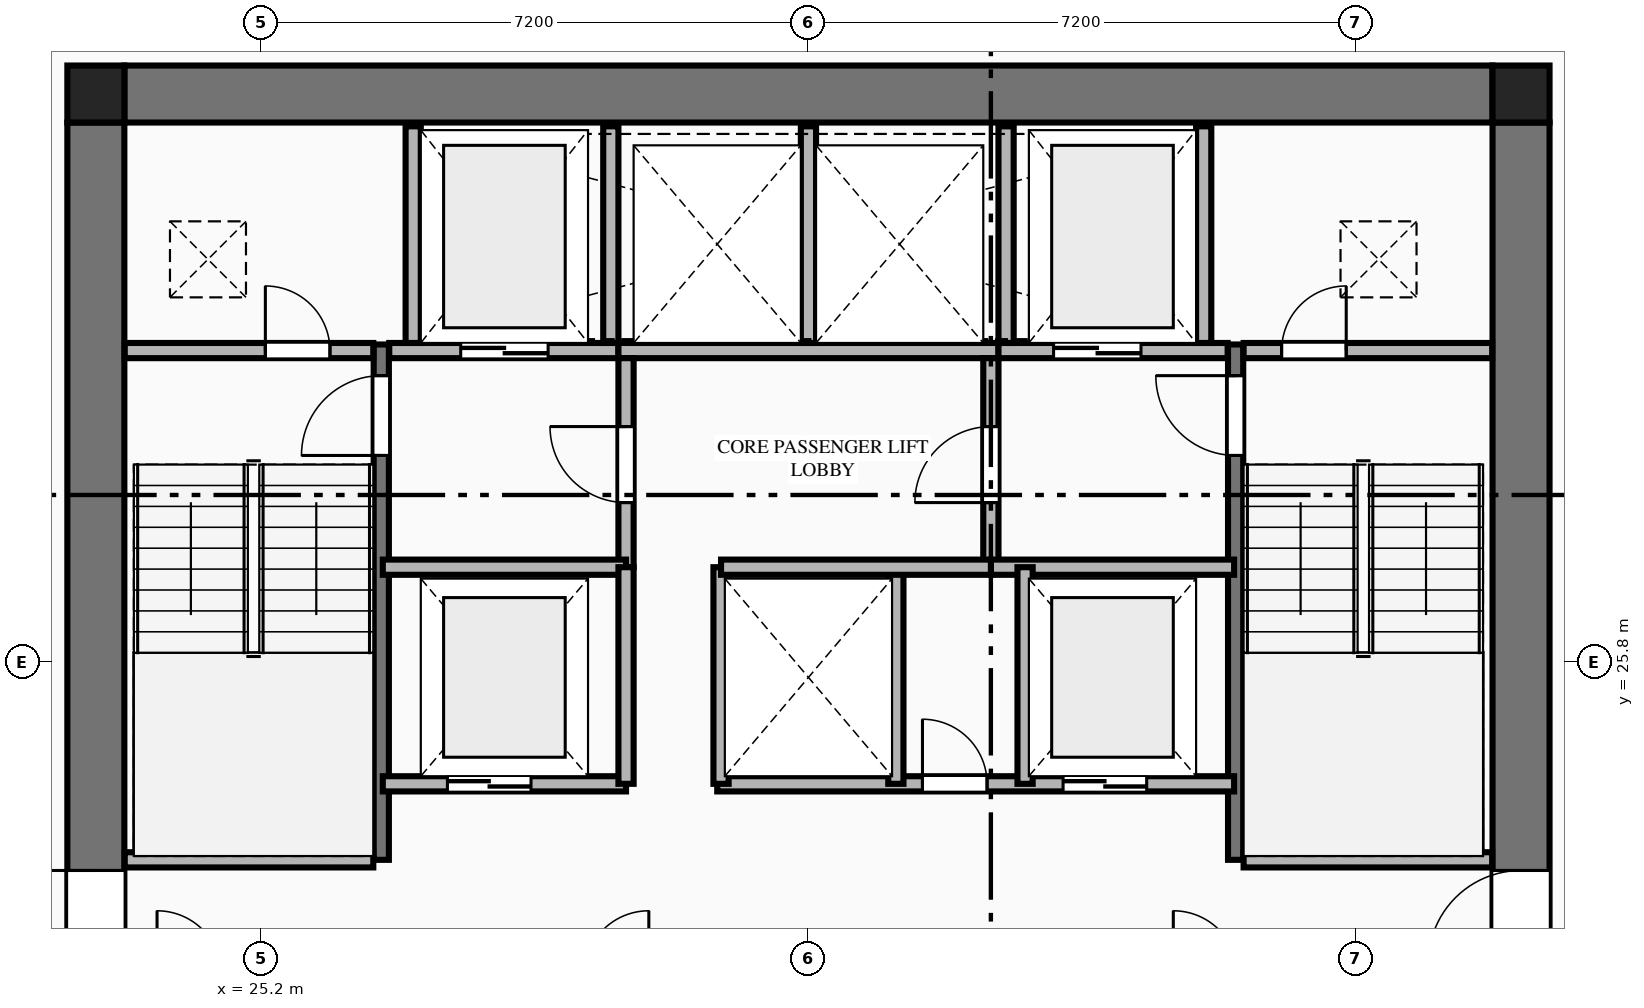
"""IFC4 building model, lengths in metres.
Left out: names, types, materials, properties, quantities, classifications, styles, units other than length and angle.
Written with IfcOpenShell. Run it as: python <this file> out.ifc"""

import sys

from ifc_helpers import new_model, si_unit, direction, frame, frame_2d, origin, origin_2d, place, context, subcontext, project, spatial, rectangle, extrude, element, fill, save


model = new_model("IFC4")
c1 = context("Model", 3, precision=1e-05, world=origin(), true_north=direction((0.0, 1.0)))
c2 = subcontext(c1, "Body", "Model", "MODEL_VIEW")
j1 = project(units=[si_unit("LENGTHUNIT", "METRE"), si_unit("PLANEANGLEUNIT", "RADIAN")], contexts=[c1])
p1 = place(None, origin())
s1 = spatial("IfcSite", under=j1, at=p1, CompositionType="ELEMENT")
p2 = place(p1, origin())
s2 = spatial("IfcBuilding", under=s1, at=p2, CompositionType="ELEMENT")
p3 = place(p2, frame((0.0, 0.0, 101.95)))
s3 = spatial("IfcBuildingStorey", under=s2, at=p3, CompositionType="ELEMENT", Elevation=101.95)
for number, where, z_axis, x_axis in (
    (1, (41.775, 33.275, 0.0), (0.0, 0.0, 1.0), (1.0, 0.0, 0.0)),
    (2, (23.025, 33.275, 0.0), (0.0, 0.0, 1.0), (1.0, 0.0, 0.0)),
):
    element("IfcColumn", number, at=place(p3, frame(where, z_axis=z_axis, x_axis=x_axis)), inside=s3, PredefinedType="COLUMN", context=c2, shape_type="SweptSolid", body=[
        extrude(rectangle(XDim=0.75, YDim=0.75, at=origin_2d()), origin(), (0.0, 0.0, 1.0), 3.55),
    ])
p4 = place(p3, frame((23.4, 33.275, 0.0), z_axis=(0.0, 0.0, 1.0), x_axis=(1.0, 0.0, 0.0)))
e3 = element("IfcWall", 3, at=p4, inside=s3, PredefinedType="SHEAR", context=c2, shape_type="SweptSolid", body=[
    extrude(rectangle(XDim=18.0, YDim=0.75, at=frame_2d((9.0, 0.0))), origin(), (0.0, 0.0, 1.0), 3.34),
])
p5 = place(p3, frame((23.025, 18.9, 0.0), z_axis=(0.0, 0.0, 1.0), x_axis=(0.0, 1.0, 0.0)))
e4 = element("IfcWall", 4, at=p5, inside=s3, PredefinedType="SHEAR", context=c2, shape_type="SweptSolid", body=[
    extrude(rectangle(XDim=14.0, YDim=0.75, at=frame_2d((7.0, 0.0))), origin(), (0.0, 0.0, 1.0), 3.34),
])
p6 = place(p5, frame((2.94, 0.0, 0.0)))
e5 = element("IfcOpeningElement", 5, at=p6, cuts=e4, PredefinedType="OPENING", context=c2, shape_type="SweptSolid", body=[
    extrude(rectangle(XDim=1.22, YDim=2.25, at=frame_2d((0.61, 1.125))), frame((0.0, 0.385, 0.0), z_axis=(0.0, -1.0, 0.0), x_axis=(1.0, 0.0, 0.0)), (0.0, 0.0, 1.0), 0.77),
])
p7 = place(p3, frame((41.775, 18.9, 0.0), z_axis=(0.0, 0.0, 1.0), x_axis=(0.0, 1.0, 0.0)))
e6 = element("IfcWall", 6, at=p7, inside=s3, PredefinedType="SHEAR", context=c2, shape_type="SweptSolid", body=[
    extrude(rectangle(XDim=14.0, YDim=0.75, at=frame_2d((7.0, 0.0))), origin(), (0.0, 0.0, 1.0), 3.34),
])
p8 = place(p7, frame((2.94, 0.0, 0.0)))
e7 = element("IfcOpeningElement", 7, at=p8, cuts=e6, PredefinedType="OPENING", context=c2, shape_type="SweptSolid", body=[
    extrude(rectangle(XDim=1.22, YDim=2.25, at=frame_2d((0.61, 1.125))), frame((0.0, 0.385, 0.0), z_axis=(0.0, -1.0, 0.0), x_axis=(1.0, 0.0, 0.0)), (0.0, 0.0, 1.0), 0.77),
])
p9 = place(p3, frame((26.78, 23.2, 0.0), z_axis=(0.0, 0.0, 1.0), x_axis=(0.0, 1.0, 0.0)))
e8 = element("IfcWall", 8, at=p9, inside=s3, PredefinedType="SHEAR", context=c2, shape_type="SweptSolid", body=[
    extrude(rectangle(XDim=6.78, YDim=0.2, at=frame_2d((3.39, 0.0))), origin(), (0.0, 0.0, 1.0), 3.55),
])
p10 = place(p9, frame((5.32, 0.0, 0.0)))
e9 = element("IfcOpeningElement", 9, at=p10, cuts=e8, PredefinedType="OPENING", context=c2, shape_type="SweptSolid", body=[
    extrude(rectangle(XDim=1.05, YDim=2.15, at=frame_2d((0.525, 1.075))), frame((0.0, 0.11, 0.0), z_axis=(0.0, -1.0, 0.0), x_axis=(1.0, 0.0, 0.0)), (0.0, 0.0, 1.0), 0.22),
])
p11 = place(p3, frame((23.405, 23.2, 0.0), z_axis=(0.0, 0.0, 1.0), x_axis=(1.0, 0.0, 0.0)))
e10 = element("IfcWall", 10, at=p11, inside=s3, PredefinedType="PLUMBINGWALL", context=c2, shape_type="SweptSolid", body=[
    extrude(rectangle(XDim=3.27, YDim=0.2, at=frame_2d((1.635, 0.0))), origin(), (0.0, 0.0, 1.0), 3.34),
])
p12 = place(p3, frame((38.02, 23.2, 0.0), z_axis=(0.0, 0.0, 1.0), x_axis=(0.0, 1.0, 0.0)))
e11 = element("IfcWall", 11, at=p12, inside=s3, PredefinedType="SHEAR", context=c2, shape_type="SweptSolid", body=[
    extrude(rectangle(XDim=6.78, YDim=0.2, at=frame_2d((3.39, 0.0))), origin(), (0.0, 0.0, 1.0), 3.55),
])
p13 = place(p12, frame((5.32, 0.0, 0.0)))
e12 = element("IfcOpeningElement", 12, at=p13, cuts=e11, PredefinedType="OPENING", context=c2, shape_type="SweptSolid", body=[
    extrude(rectangle(XDim=1.05, YDim=2.15, at=frame_2d((0.525, 1.075))), frame((0.0, 0.11, 0.0), z_axis=(0.0, -1.0, 0.0), x_axis=(1.0, 0.0, 0.0)), (0.0, 0.0, 1.0), 0.22),
])
p14 = place(p3, frame((38.125, 23.2, 0.0), z_axis=(0.0, 0.0, 1.0), x_axis=(1.0, 0.0, 0.0)))
e13 = element("IfcWall", 13, at=p14, inside=s3, PredefinedType="PLUMBINGWALL", context=c2, shape_type="SweptSolid", body=[
    extrude(rectangle(XDim=3.27, YDim=0.2, at=frame_2d((1.635, 0.0))), origin(), (0.0, 0.0, 1.0), 3.34),
])
p15 = place(p3, frame((23.405, 29.9, 0.0), z_axis=(0.0, 0.0, 1.0), x_axis=(1.0, 0.0, 0.0)))
e14 = element("IfcWall", 14, at=p15, inside=s3, PredefinedType="PLUMBINGWALL", context=c2, shape_type="SweptSolid", body=[
    extrude(rectangle(XDim=3.27, YDim=0.2, at=frame_2d((1.635, 0.0))), origin(), (0.0, 0.0, 1.0), 3.34),
])
p16 = place(p15, frame((1.85, 0.0, 0.0)))
e15 = element("IfcOpeningElement", 15, at=p16, cuts=e14, PredefinedType="OPENING", context=c2, shape_type="SweptSolid", body=[
    extrude(rectangle(XDim=0.85, YDim=2.05, at=frame_2d((0.425, 1.025))), frame((0.0, 0.11, 0.0), z_axis=(0.0, -1.0, 0.0), x_axis=(1.0, 0.0, 0.0)), (0.0, 0.0, 1.0), 0.22),
])
p17 = place(p3, frame((26.885, 29.9, 0.0), z_axis=(0.0, 0.0, 1.0), x_axis=(1.0, 0.0, 0.0)))
e16 = element("IfcWall", 16, at=p17, inside=s3, PredefinedType="PLUMBINGWALL", context=c2, shape_type="SweptSolid", body=[
    extrude(rectangle(XDim=3.015, YDim=0.2, at=frame_2d((1.507, 0.0))), origin(), (0.0, 0.0, 1.0), 3.34),
])
p18 = place(p17, frame((0.94, 0.0, 0.0)))
e17 = element("IfcOpeningElement", 17, at=p18, cuts=e16, PredefinedType="OPENING", context=c2, shape_type="SweptSolid", body=[
    extrude(rectangle(XDim=1.15, YDim=2.2, at=frame_2d((0.575, 1.1))), frame((0.0, 0.11, 0.0), z_axis=(0.0, -1.0, 0.0), x_axis=(1.0, 0.0, 0.0)), (0.0, 0.0, 1.0), 0.22),
])
p19 = place(p3, frame((29.9, 29.9, 0.0), z_axis=(0.0, 0.0, 1.0), x_axis=(1.0, 0.0, 0.0)))
e18 = element("IfcWall", 18, at=p19, inside=s3, PredefinedType="PLUMBINGWALL", context=c2, shape_type="SweptSolid", body=[
    extrude(rectangle(XDim=5.0, YDim=0.2, at=frame_2d((2.5, 0.0))), origin(), (0.0, 0.0, 1.0), 3.34),
])
p20 = place(p3, frame((34.9, 29.9, 0.0), z_axis=(0.0, 0.0, 1.0), x_axis=(1.0, 0.0, 0.0)))
e19 = element("IfcWall", 19, at=p20, inside=s3, PredefinedType="PLUMBINGWALL", context=c2, shape_type="SweptSolid", body=[
    extrude(rectangle(XDim=3.015, YDim=0.2, at=frame_2d((1.508, 0.0))), origin(), (0.0, 0.0, 1.0), 3.34),
])
p21 = place(p20, frame((0.725, 0.0, 0.0)))
e20 = element("IfcOpeningElement", 20, at=p21, cuts=e19, PredefinedType="OPENING", context=c2, shape_type="SweptSolid", body=[
    extrude(rectangle(XDim=1.15, YDim=2.2, at=frame_2d((0.575, 1.1))), frame((0.0, 0.11, 0.0), z_axis=(0.0, -1.0, 0.0), x_axis=(1.0, 0.0, 0.0)), (0.0, 0.0, 1.0), 0.22),
])
p22 = place(p3, frame((38.125, 29.9, 0.0), z_axis=(0.0, 0.0, 1.0), x_axis=(1.0, 0.0, 0.0)))
e21 = element("IfcWall", 21, at=p22, inside=s3, PredefinedType="PLUMBINGWALL", context=c2, shape_type="SweptSolid", body=[
    extrude(rectangle(XDim=3.27, YDim=0.2, at=frame_2d((1.635, 0.0))), origin(), (0.0, 0.0, 1.0), 3.34),
])
p23 = place(p22, frame((0.5, 0.0, 0.0)))
e22 = element("IfcOpeningElement", 22, at=p23, cuts=e21, PredefinedType="OPENING", context=c2, shape_type="SweptSolid", body=[
    extrude(rectangle(XDim=0.85, YDim=2.05, at=frame_2d((0.425, 1.025))), frame((0.0, 0.11, 0.0), z_axis=(0.0, -1.0, 0.0), x_axis=(1.0, 0.0, 0.0)), (0.0, 0.0, 1.0), 0.22),
])
for number, where, z_axis, x_axis in (
    (23, (27.2, 30.0, 0.0), (0.0, 0.0, 1.0), (0.0, 1.0, 0.0)),
    (24, (29.8, 30.0, 0.0), (0.0, 0.0, 1.0), (0.0, 1.0, 0.0)),
    (25, (32.4, 30.0, 0.0), (0.0, 0.0, 1.0), (0.0, 1.0, 0.0)),
    (26, (35.0, 30.0, 0.0), (0.0, 0.0, 1.0), (0.0, 1.0, 0.0)),
    (27, (37.6, 30.0, 0.0), (0.0, 0.0, 1.0), (0.0, 1.0, 0.0)),
):
    element("IfcWall", number, at=place(p3, frame(where, z_axis=z_axis, x_axis=x_axis)), inside=s3, PredefinedType="PLUMBINGWALL", context=c2, shape_type="SweptSolid", body=[
        extrude(rectangle(XDim=2.85, YDim=0.2, at=frame_2d((1.425, 0.0))), origin(), (0.0, 0.0, 1.0), 3.34),
    ])
p24 = place(p3, frame((30.0, 27.05, 0.0), z_axis=(0.0, 0.0, 1.0), x_axis=(0.0, 1.0, 0.0)))
e28 = element("IfcWall", 28, at=p24, inside=s3, PredefinedType="PLUMBINGWALL", context=c2, shape_type="SweptSolid", body=[
    extrude(rectangle(XDim=2.75, YDim=0.2, at=frame_2d((1.375, 0.0))), origin(), (0.0, 0.0, 1.0), 3.34),
])
p25 = place(p24, frame((0.85, 0.0, 0.0)))
e29 = element("IfcOpeningElement", 29, at=p25, cuts=e28, PredefinedType="OPENING", context=c2, shape_type="SweptSolid", body=[
    extrude(rectangle(XDim=1.0, YDim=2.15, at=frame_2d((0.5, 1.075))), frame((0.0, 0.11, 0.0), z_axis=(0.0, -1.0, 0.0), x_axis=(1.0, 0.0, 0.0)), (0.0, 0.0, 1.0), 0.22),
])
p26 = place(p3, frame((26.8, 27.05, 0.0), z_axis=(0.0, 0.0, 1.0), x_axis=(1.0, 0.0, 0.0)))
e30 = element("IfcWall", 30, at=p26, inside=s3, PredefinedType="PLUMBINGWALL", context=c2, shape_type="SweptSolid", body=[
    extrude(rectangle(XDim=3.2, YDim=0.2, at=frame_2d((1.6, 0.0))), origin(), (0.0, 0.0, 1.0), 3.34),
])
p27 = place(p3, frame((34.8, 27.05, 0.0), z_axis=(0.0, 0.0, 1.0), x_axis=(0.0, 1.0, 0.0)))
e31 = element("IfcWall", 31, at=p27, inside=s3, PredefinedType="PLUMBINGWALL", context=c2, shape_type="SweptSolid", body=[
    extrude(rectangle(XDim=2.75, YDim=0.2, at=frame_2d((1.375, 0.0))), origin(), (0.0, 0.0, 1.0), 3.34),
])
p28 = place(p27, frame((0.85, 0.0, 0.0)))
e32 = element("IfcOpeningElement", 32, at=p28, cuts=e31, PredefinedType="OPENING", context=c2, shape_type="SweptSolid", body=[
    extrude(rectangle(XDim=1.0, YDim=2.15, at=frame_2d((0.5, 1.075))), frame((0.0, 0.11, 0.0), z_axis=(0.0, -1.0, 0.0), x_axis=(1.0, 0.0, 0.0)), (0.0, 0.0, 1.0), 0.22),
])
p29 = place(p3, frame((34.8, 27.05, 0.0), z_axis=(0.0, 0.0, 1.0), x_axis=(1.0, 0.0, 0.0)))
e33 = element("IfcWall", 33, at=p29, inside=s3, PredefinedType="PLUMBINGWALL", context=c2, shape_type="SweptSolid", body=[
    extrude(rectangle(XDim=3.2, YDim=0.2, at=frame_2d((1.6, 0.0))), origin(), (0.0, 0.0, 1.0), 3.34),
])
p30 = place(p3, frame((26.8, 24.2, 0.0), z_axis=(0.0, 0.0, 1.0), x_axis=(1.0, 0.0, 0.0)))
e34 = element("IfcWall", 34, at=p30, inside=s3, PredefinedType="PLUMBINGWALL", context=c2, shape_type="SweptSolid", body=[
    extrude(rectangle(XDim=3.2, YDim=0.2, at=frame_2d((1.6, 0.0))), origin(), (0.0, 0.0, 1.0), 3.34),
])
p31 = place(p30, frame((0.85, 0.0, 0.0)))
e35 = element("IfcOpeningElement", 35, at=p31, cuts=e34, PredefinedType="OPENING", context=c2, shape_type="SweptSolid", body=[
    extrude(rectangle(XDim=1.1, YDim=2.2, at=frame_2d((0.55, 1.1))), frame((0.0, 0.11, 0.0), z_axis=(0.0, -1.0, 0.0), x_axis=(1.0, 0.0, 0.0)), (0.0, 0.0, 1.0), 0.22),
])
p32 = place(p3, frame((30.0, 24.2, 0.0), z_axis=(0.0, 0.0, 1.0), x_axis=(0.0, 1.0, 0.0)))
e36 = element("IfcWall", 36, at=p32, inside=s3, PredefinedType="PLUMBINGWALL", context=c2, shape_type="SweptSolid", body=[
    extrude(rectangle(XDim=2.85, YDim=0.2, at=frame_2d((1.425, 0.0))), origin(), (0.0, 0.0, 1.0), 3.34),
])
p33 = place(p3, frame((31.2, 24.2, 0.0), z_axis=(0.0, 0.0, 1.0), x_axis=(1.0, 0.0, 0.0)))
e37 = element("IfcWall", 37, at=p33, inside=s3, PredefinedType="PLUMBINGWALL", context=c2, shape_type="SweptSolid", body=[
    extrude(rectangle(XDim=6.8, YDim=0.2, at=frame_2d((3.4, 0.0))), origin(), (0.0, 0.0, 1.0), 3.34),
])
p34 = place(p33, frame((2.7, 0.0, 0.0)))
e38 = element("IfcOpeningElement", 38, at=p34, cuts=e37, PredefinedType="OPENING", context=c2, shape_type="SweptSolid", body=[
    extrude(rectangle(XDim=0.85, YDim=2.05, at=frame_2d((0.425, 1.025))), frame((0.0, 0.11, 0.0), z_axis=(0.0, -1.0, 0.0), x_axis=(1.0, 0.0, 0.0)), (0.0, 0.0, 1.0), 0.22),
])
p35 = place(p33, frame((4.55, 0.0, 0.0)))
e39 = element("IfcOpeningElement", 39, at=p35, cuts=e37, PredefinedType="OPENING", context=c2, shape_type="SweptSolid", body=[
    extrude(rectangle(XDim=1.1, YDim=2.2, at=frame_2d((0.55, 1.1))), frame((0.0, 0.11, 0.0), z_axis=(0.0, -1.0, 0.0), x_axis=(1.0, 0.0, 0.0)), (0.0, 0.0, 1.0), 0.22),
])
for number, where, z_axis, x_axis in (
    (40, (31.25, 24.2, 0.0), (0.0, 0.0, 1.0), (0.0, 1.0, 0.0)),
    (41, (33.55, 24.2, 0.0), (0.0, 0.0, 1.0), (0.0, 1.0, 0.0)),
    (42, (35.25, 24.2, 0.0), (0.0, 0.0, 1.0), (0.0, 1.0, 0.0)),
):
    element("IfcWall", number, at=place(p3, frame(where, z_axis=z_axis, x_axis=x_axis)), inside=s3, PredefinedType="PLUMBINGWALL", context=c2, shape_type="SweptSolid", body=[
        extrude(rectangle(XDim=2.85, YDim=0.2, at=frame_2d((1.425, 0.0))), origin(), (0.0, 0.0, 1.0), 3.34),
    ])
p36 = place(p3, frame((31.25, 27.05, 0.0), z_axis=(0.0, 0.0, 1.0), x_axis=(1.0, 0.0, 0.0)))
e43 = element("IfcWall", 43, at=p36, inside=s3, PredefinedType="PLUMBINGWALL", context=c2, shape_type="SweptSolid", body=[
    extrude(rectangle(XDim=3.55, YDim=0.2, at=frame_2d((1.775, 0.0))), origin(), (0.0, 0.0, 1.0), 3.34),
])
p37 = place(p6, origin())
e44 = element("IfcDoor", 44, at=p37, inside=s3, OperationType="SINGLE_SWING_RIGHT", PredefinedType="DOOR", context=c2, shape_type="SweptSolid", body=[
    extrude(rectangle(XDim=1.22, YDim=2.25, at=frame_2d((0.61, 1.125))), frame((0.0, 0.025, 0.0), z_axis=(0.0, -1.0, 0.0), x_axis=(1.0, 0.0, 0.0)), (0.0, 0.0, 1.0), 0.05),
])
fill(e5, e44)
p38 = place(p8, origin())
e45 = element("IfcDoor", 45, at=p38, inside=s3, OperationType="SINGLE_SWING_LEFT", PredefinedType="DOOR", context=c2, shape_type="SweptSolid", body=[
    extrude(rectangle(XDim=1.22, YDim=2.25, at=frame_2d((0.61, 1.125))), frame((0.0, 0.025, 0.0), z_axis=(0.0, -1.0, 0.0), x_axis=(1.0, 0.0, 0.0)), (0.0, 0.0, 1.0), 0.05),
])
fill(e7, e45)
p39 = place(p10, origin())
e46 = element("IfcDoor", 46, at=p39, inside=s3, OperationType="SINGLE_SWING_LEFT", PredefinedType="DOOR", context=c2, shape_type="SweptSolid", body=[
    extrude(rectangle(XDim=1.05, YDim=2.15, at=frame_2d((0.525, 1.075))), frame((0.0, 0.025, 0.0), z_axis=(0.0, -1.0, 0.0), x_axis=(1.0, 0.0, 0.0)), (0.0, 0.0, 1.0), 0.05),
])
fill(e9, e46)
p40 = place(p13, origin())
e47 = element("IfcDoor", 47, at=p40, inside=s3, OperationType="SINGLE_SWING_RIGHT", PredefinedType="DOOR", context=c2, shape_type="SweptSolid", body=[
    extrude(rectangle(XDim=1.05, YDim=2.15, at=frame_2d((0.525, 1.075))), frame((0.0, 0.025, 0.0), z_axis=(0.0, -1.0, 0.0), x_axis=(1.0, 0.0, 0.0)), (0.0, 0.0, 1.0), 0.05),
])
fill(e12, e47)
p41 = place(p16, origin())
e48 = element("IfcDoor", 48, at=p41, inside=s3, OperationType="SINGLE_SWING_LEFT", PredefinedType="DOOR", context=c2, shape_type="SweptSolid", body=[
    extrude(rectangle(XDim=0.85, YDim=2.05, at=frame_2d((0.425, 1.025))), frame((0.0, 0.025, 0.0), z_axis=(0.0, -1.0, 0.0), x_axis=(1.0, 0.0, 0.0)), (0.0, 0.0, 1.0), 0.05),
])
fill(e15, e48)
p42 = place(p23, origin())
e49 = element("IfcDoor", 49, at=p42, inside=s3, OperationType="SINGLE_SWING_RIGHT", PredefinedType="DOOR", context=c2, shape_type="SweptSolid", body=[
    extrude(rectangle(XDim=0.85, YDim=2.05, at=frame_2d((0.425, 1.025))), frame((0.0, 0.025, 0.0), z_axis=(0.0, -1.0, 0.0), x_axis=(1.0, 0.0, 0.0)), (0.0, 0.0, 1.0), 0.05),
])
fill(e22, e49)
p43 = place(p18, origin())
e50 = element("IfcDoor", 50, at=p43, inside=s3, OperationType="DOUBLE_DOOR_SLIDING", PredefinedType="DOOR", context=c2, shape_type="SweptSolid", body=[
    extrude(rectangle(XDim=1.15, YDim=2.2, at=frame_2d((0.575, 1.1))), frame((0.0, 0.025, 0.0), z_axis=(0.0, -1.0, 0.0), x_axis=(1.0, 0.0, 0.0)), (0.0, 0.0, 1.0), 0.05),
])
fill(e17, e50)
p44 = place(p21, origin())
e51 = element("IfcDoor", 51, at=p44, inside=s3, OperationType="DOUBLE_DOOR_SLIDING", PredefinedType="DOOR", context=c2, shape_type="SweptSolid", body=[
    extrude(rectangle(XDim=1.15, YDim=2.2, at=frame_2d((0.575, 1.1))), frame((0.0, 0.025, 0.0), z_axis=(0.0, -1.0, 0.0), x_axis=(1.0, 0.0, 0.0)), (0.0, 0.0, 1.0), 0.05),
])
fill(e20, e51)
p45 = place(p25, origin())
e52 = element("IfcDoor", 52, at=p45, inside=s3, OperationType="SINGLE_SWING_RIGHT", PredefinedType="DOOR", context=c2, shape_type="SweptSolid", body=[
    extrude(rectangle(XDim=1.0, YDim=2.15, at=frame_2d((0.5, 1.075))), frame((0.0, 0.025, 0.0), z_axis=(0.0, -1.0, 0.0), x_axis=(1.0, 0.0, 0.0)), (0.0, 0.0, 1.0), 0.05),
])
fill(e29, e52)
p46 = place(p28, origin())
e53 = element("IfcDoor", 53, at=p46, inside=s3, OperationType="SINGLE_SWING_LEFT", PredefinedType="DOOR", context=c2, shape_type="SweptSolid", body=[
    extrude(rectangle(XDim=1.0, YDim=2.15, at=frame_2d((0.5, 1.075))), frame((0.0, 0.025, 0.0), z_axis=(0.0, -1.0, 0.0), x_axis=(1.0, 0.0, 0.0)), (0.0, 0.0, 1.0), 0.05),
])
fill(e32, e53)
p47 = place(p31, origin())
e54 = element("IfcDoor", 54, at=p47, inside=s3, OperationType="DOUBLE_DOOR_SLIDING", PredefinedType="DOOR", context=c2, shape_type="SweptSolid", body=[
    extrude(rectangle(XDim=1.1, YDim=2.2, at=frame_2d((0.55, 1.1))), frame((0.0, 0.025, 0.0), z_axis=(0.0, -1.0, 0.0), x_axis=(1.0, 0.0, 0.0)), (0.0, 0.0, 1.0), 0.05),
])
fill(e35, e54)
p48 = place(p34, origin())
e55 = element("IfcDoor", 55, at=p48, inside=s3, OperationType="SINGLE_SWING_LEFT", PredefinedType="DOOR", context=c2, shape_type="SweptSolid", body=[
    extrude(rectangle(XDim=0.85, YDim=2.05, at=frame_2d((0.425, 1.025))), frame((0.0, 0.025, 0.0), z_axis=(0.0, -1.0, 0.0), x_axis=(1.0, 0.0, 0.0)), (0.0, 0.0, 1.0), 0.05),
])
fill(e38, e55)
p49 = place(p35, origin())
e56 = element("IfcDoor", 56, at=p49, inside=s3, OperationType="DOUBLE_DOOR_SLIDING", PredefinedType="DOOR", context=c2, shape_type="SweptSolid", body=[
    extrude(rectangle(XDim=1.1, YDim=2.2, at=frame_2d((0.55, 1.1))), frame((0.0, 0.025, 0.0), z_axis=(0.0, -1.0, 0.0), x_axis=(1.0, 0.0, 0.0)), (0.0, 0.0, 1.0), 0.05),
])
fill(e39, e56)
save(model, sys.argv[1])
